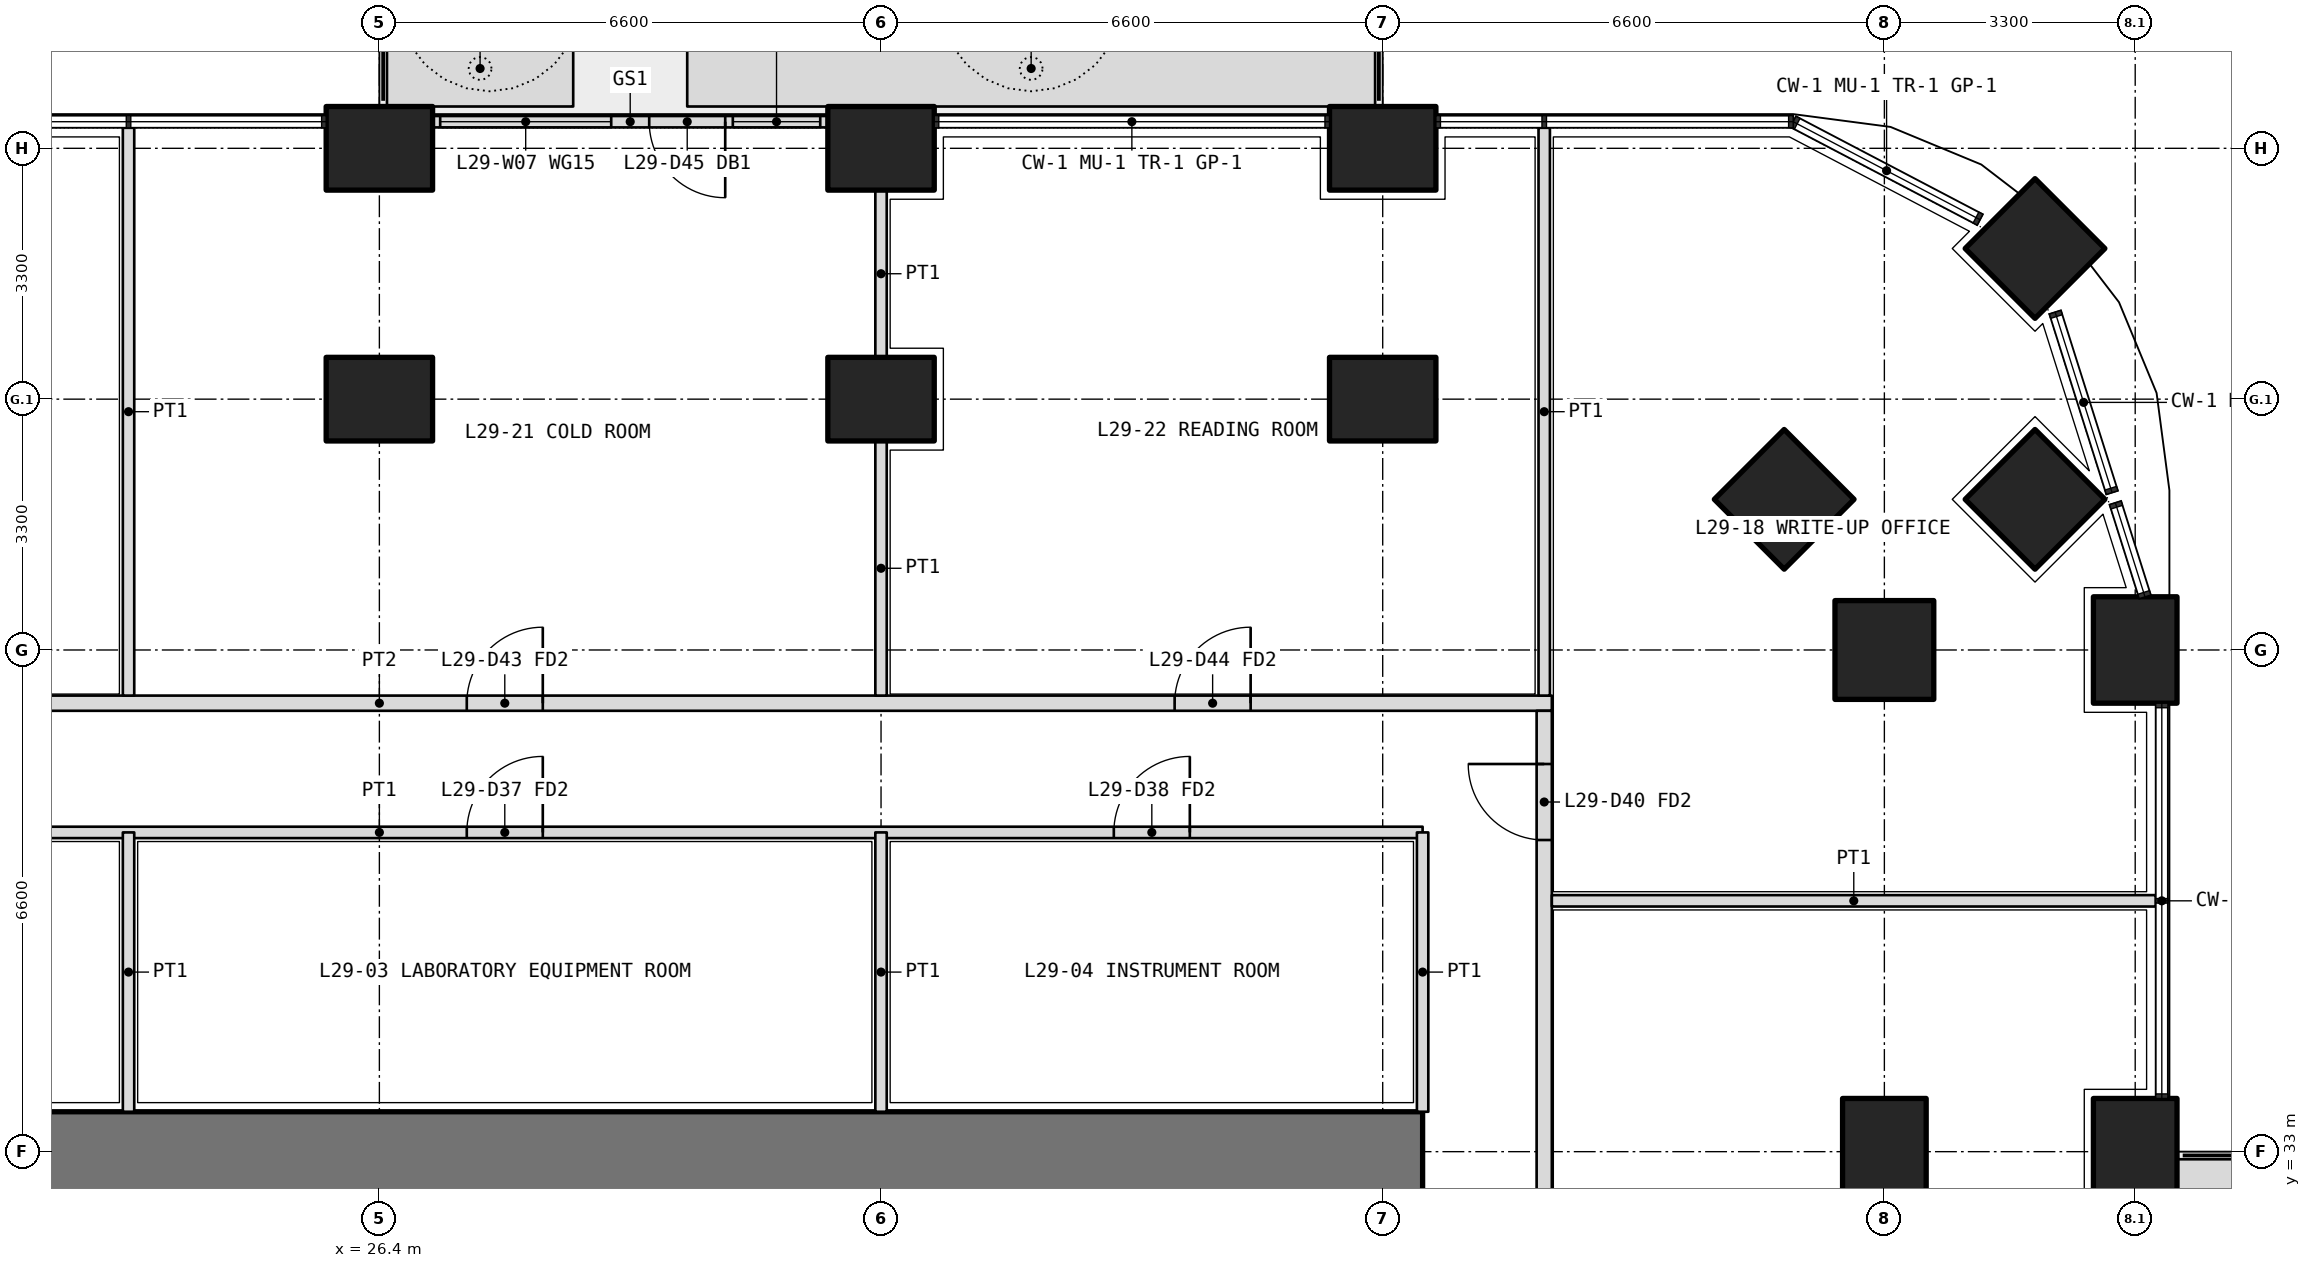
"""IFC4 building model, lengths in metres.
Left out: names, types, materials, properties, quantities, classifications, styles, units other than length and angle.
Written with IfcOpenShell. Run it as: python <this file> out.ifc"""

import sys

from ifc_helpers import new_model, si_unit, direction, frame, frame_2d, origin, origin_2d, place, context, subcontext, project, spatial, polyline, rectangle, outline, extrude, element, fill, save


model = new_model("IFC4")
c1 = context("Model", 3, precision=1e-05, world=origin(), true_north=direction((0.0, 1.0)))
c2 = subcontext(c1, "Body", "Model", "MODEL_VIEW")
j1 = project(units=[si_unit("LENGTHUNIT", "METRE"), si_unit("PLANEANGLEUNIT", "RADIAN")], contexts=[c1])
p1 = place(None, origin())
s1 = spatial("IfcSite", under=j1, at=p1, CompositionType="ELEMENT")
p2 = place(p1, origin())
s2 = spatial("IfcBuilding", under=s1, at=p2, CompositionType="ELEMENT")
p3 = place(p2, frame((0.0, 0.0, 128.4)))
s3 = spatial("IfcBuildingStorey", under=s2, at=p3, CompositionType="ELEMENT", Elevation=128.4)
p4 = place(p3, frame((48.182, 44.882, 0.0), z_axis=(0.0, 0.0, 1.0), x_axis=(0.707106781187, 0.707106781187, 0.0)))
e1 = element("IfcColumn", 1, at=p4, inside=s3, PredefinedType="COLUMN", context=c2, shape_type="SweptSolid", body=[
    extrude(rectangle(XDim=1.3, YDim=1.3, at=origin_2d()), origin(), (0.0, 0.0, 1.0), 4.2),
])
for number, where, z_axis, x_axis in (
    (2, (49.5, 33.0, 0.0), (0.0, 0.0, 1.0), (0.0, 1.0, 0.0)),
    (3, (49.5, 39.6, 0.0), (0.0, 0.0, 1.0), (0.0, 1.0, 0.0)),
    (4, (26.4, 46.2, 0.0), (0.0, 0.0, 1.0), (1.0, 0.0, 0.0)),
    (5, (33.0, 46.2, 0.0), (0.0, 0.0, 1.0), (1.0, 0.0, 0.0)),
    (6, (39.6, 46.2, 0.0), (0.0, 0.0, 1.0), (1.0, 0.0, 0.0)),
):
    element("IfcColumn", number, at=place(p3, frame(where, z_axis=z_axis, x_axis=x_axis)), inside=s3, PredefinedType="COLUMN", context=c2, shape_type="SweptSolid", body=[
        extrude(rectangle(XDim=1.4, YDim=1.1, at=origin_2d()), origin(), (0.0, 0.0, 1.0), 4.2),
    ])
for number, where, z_axis, x_axis in (
    (7, (46.2, 39.6, 0.0), (0.0, 0.0, 1.0), (1.0, 0.0, 0.0)),
    (8, (48.182, 41.582, 0.0), (0.0, 0.0, 1.0), (0.707, 0.707, 0.0)),
):
    element("IfcColumn", number, at=place(p3, frame(where, z_axis=z_axis, x_axis=x_axis)), inside=s3, PredefinedType="COLUMN", context=c2, shape_type="SweptSolid", body=[
        extrude(rectangle(XDim=1.3, YDim=1.3, at=origin_2d()), origin(), (0.0, 0.0, 1.0), 4.2),
    ])
for number, where, z_axis, x_axis in (
    (9, (26.4, 42.9, 0.0), (0.0, 0.0, 1.0), (1.0, 0.0, 0.0)),
    (10, (33.0, 42.9, 0.0), (0.0, 0.0, 1.0), (1.0, 0.0, 0.0)),
    (11, (39.6, 42.9, 0.0), (0.0, 0.0, 1.0), (1.0, 0.0, 0.0)),
):
    element("IfcColumn", number, at=place(p3, frame(where, z_axis=z_axis, x_axis=x_axis)), inside=s3, PredefinedType="COLUMN", context=c2, shape_type="SweptSolid", body=[
        extrude(rectangle(XDim=1.4, YDim=1.1, at=origin_2d()), origin(), (0.0, 0.0, 1.0), 4.2),
    ])
p5 = place(p3, frame((44.882, 41.582, 0.0), z_axis=(0.0, 0.0, 1.0), x_axis=(0.707106781187, 0.707106781187, 0.0)))
e12 = element("IfcColumn", 12, at=p5, inside=s3, PredefinedType="COLUMN", context=c2, shape_type="SweptSolid", body=[
    extrude(rectangle(XDim=1.3, YDim=1.3, at=origin_2d()), origin(), (0.0, 0.0, 1.0), 4.2),
])
p6 = place(p3, frame((46.2, 33.0, 0.0), z_axis=(0.0, 0.0, 1.0), x_axis=(0.0, 1.0, 0.0)))
e13 = element("IfcColumn", 13, at=p6, inside=s3, PredefinedType="COLUMN", context=c2, shape_type="SweptSolid", body=[
    extrude(rectangle(XDim=1.4, YDim=1.1, at=origin_2d()), origin(), (0.0, 0.0, 1.0), 4.2),
])
p7 = place(p3, origin())
e14 = element("IfcWall", 14, at=p7, inside=s3, PredefinedType="USERDEFINED", context=c2, shape_type="SweptSolid", body=[
    extrude(outline(polyline([(50.05, 23.85), (51.05, 23.85), (51.05, 32.9), (50.05, 32.9), (50.05, 23.85)]), holes=[polyline([(50.2, 24.0), (50.9, 24.0), (50.9, 32.75), (50.2, 32.75), (50.2, 24.0)])]), origin(), (0.0, 0.0, 1.0), 1.05),
])
p8 = place(p3, origin())
e15 = element("IfcWall", 15, at=p8, inside=s3, PredefinedType="USERDEFINED", context=c2, shape_type="SweptSolid", body=[
    extrude(outline(polyline([(26.5, 46.75), (28.95, 46.75), (28.95, 47.75), (26.5, 47.75), (26.5, 46.75)]), holes=[polyline([(26.65, 46.9), (28.8, 46.9), (28.8, 47.6), (26.65, 47.6), (26.65, 46.9)])]), origin(), (0.0, 0.0, 1.0), 1.05),
])
p9 = place(p3, origin())
e16 = element("IfcWall", 16, at=p9, inside=s3, PredefinedType="USERDEFINED", context=c2, shape_type="SweptSolid", body=[
    extrude(outline(polyline([(30.45, 46.75), (39.5, 46.75), (39.5, 47.75), (30.45, 47.75), (30.45, 46.75)]), holes=[polyline([(30.6, 46.9), (39.35, 46.9), (39.35, 47.6), (30.6, 47.6), (30.6, 46.9)])]), origin(), (0.0, 0.0, 1.0), 1.05),
])
p10 = place(p3, frame((32.3, 46.55, 0.0), z_axis=(0.0, 0.0, 1.0), x_axis=(-1.0, 0.0, 0.0)))
e17 = element("IfcWall", 17, at=p10, inside=s3, PredefinedType="SOLIDWALL", context=c2, shape_type="SweptSolid", body=[
    extrude(rectangle(XDim=5.2, YDim=0.15, at=frame_2d((2.6, 0.0))), origin(), (0.0, 0.0, 1.0), 2.7),
])
p11 = place(p10, frame((1.35, 0.0, 0.0)))
e18 = element("IfcOpeningElement", 18, at=p11, cuts=e17, PredefinedType="OPENING", context=c2, shape_type="SweptSolid", body=[
    extrude(rectangle(XDim=1.0, YDim=2.4, at=frame_2d((0.5, 1.2))), frame((0.0, 0.085, 0.0), z_axis=(0.0, -1.0, 0.0), x_axis=(1.0, 0.0, 0.0)), (0.0, 0.0, 1.0), 0.17),
])
p12 = place(p10, frame((0.1, 0.0, 0.1)))
e19 = element("IfcOpeningElement", 19, at=p12, cuts=e17, PredefinedType="OPENING", context=c2, shape_type="SweptSolid", body=[
    extrude(rectangle(XDim=1.15, YDim=2.3, at=frame_2d((0.575, 1.15))), frame((0.0, 0.085, 0.0), z_axis=(0.0, -1.0, 0.0), x_axis=(1.0, 0.0, 0.0)), (0.0, 0.0, 1.0), 0.17),
])
p13 = place(p10, frame((2.85, 0.0, 0.1)))
e20 = element("IfcOpeningElement", 20, at=p13, cuts=e17, PredefinedType="OPENING", context=c2, shape_type="SweptSolid", body=[
    extrude(rectangle(XDim=2.25, YDim=2.3, at=frame_2d((1.125, 1.15))), frame((0.0, 0.085, 0.0), z_axis=(0.0, -1.0, 0.0), x_axis=(1.0, 0.0, 0.0)), (0.0, 0.0, 1.0), 0.17),
])
p14 = place(p3, frame((40.125, 33.0, 0.0), z_axis=(0.0, 0.0, 1.0), x_axis=(-1.0, 0.0, 0.0)))
e21 = element("IfcWall", 21, at=p14, inside=s3, PredefinedType="SHEAR", context=c2, shape_type="SweptSolid", body=[
    extrude(rectangle(XDim=27.45, YDim=1.05, at=frame_2d((13.725, 0.0))), origin(), (0.0, 0.0, 1.0), 4.2),
])
p15 = place(p3, frame((12.675, 37.2, 0.0), z_axis=(0.0, 0.0, 1.0), x_axis=(1.0, 0.0, 0.0)))
e22 = element("IfcWall", 22, at=p15, inside=s3, PredefinedType="PARTITIONING", context=c2, shape_type="SweptSolid", body=[
    extrude(rectangle(XDim=27.45, YDim=0.15, at=frame_2d((13.725, 0.0))), origin(), (0.0, 0.0, 1.0), 2.85),
])
p16 = place(p15, frame((1.413, 0.0, 0.0)))
e23 = element("IfcOpeningElement", 23, at=p16, cuts=e22, PredefinedType="OPENING", context=c2, shape_type="SweptSolid", body=[
    extrude(rectangle(XDim=1.0, YDim=2.1, at=frame_2d((0.5, 1.05))), frame((0.0, 0.085, 0.0), z_axis=(0.0, -1.0, 0.0), x_axis=(1.0, 0.0, 0.0)), (0.0, 0.0, 1.0), 0.17),
])
p17 = place(p15, frame((6.625, 0.0, 0.0)))
e24 = element("IfcOpeningElement", 24, at=p17, cuts=e22, PredefinedType="OPENING", context=c2, shape_type="SweptSolid", body=[
    extrude(rectangle(XDim=1.0, YDim=2.1, at=frame_2d((0.5, 1.05))), frame((0.0, 0.085, 0.0), z_axis=(0.0, -1.0, 0.0), x_axis=(1.0, 0.0, 0.0)), (0.0, 0.0, 1.0), 0.17),
])
p18 = place(p15, frame((14.875, 0.0, 0.0)))
e25 = element("IfcOpeningElement", 25, at=p18, cuts=e22, PredefinedType="OPENING", context=c2, shape_type="SweptSolid", body=[
    extrude(rectangle(XDim=1.0, YDim=2.1, at=frame_2d((0.5, 1.05))), frame((0.0, 0.085, 0.0), z_axis=(0.0, -1.0, 0.0), x_axis=(1.0, 0.0, 0.0)), (0.0, 0.0, 1.0), 0.17),
])
p19 = place(p15, frame((23.387, 0.0, 0.0)))
e26 = element("IfcOpeningElement", 26, at=p19, cuts=e22, PredefinedType="OPENING", context=c2, shape_type="SweptSolid", body=[
    extrude(rectangle(XDim=1.0, YDim=2.1, at=frame_2d((0.5, 1.05))), frame((0.0, 0.085, 0.0), z_axis=(0.0, -1.0, 0.0), x_axis=(1.0, 0.0, 0.0)), (0.0, 0.0, 1.0), 0.17),
])
p20 = place(p3, frame((40.125, 33.525, 0.0), z_axis=(0.0, 0.0, 1.0), x_axis=(0.0, 1.0, 0.0)))
e27 = element("IfcWall", 27, at=p20, inside=s3, PredefinedType="PARTITIONING", context=c2, shape_type="SweptSolid", body=[
    extrude(rectangle(XDim=3.675, YDim=0.15, at=frame_2d((1.837, 0.0))), origin(), (0.0, 0.0, 1.0), 2.85),
])
p21 = place(p3, frame((23.1, 33.525, 0.0), z_axis=(0.0, 0.0, 1.0), x_axis=(0.0, 1.0, 0.0)))
e28 = element("IfcWall", 28, at=p21, inside=s3, PredefinedType="PARTITIONING", context=c2, shape_type="SweptSolid", body=[
    extrude(rectangle(XDim=3.675, YDim=0.15, at=frame_2d((1.837, 0.0))), origin(), (0.0, 0.0, 1.0), 3.9),
])
p22 = place(p3, frame((33.0, 33.525, 0.0), z_axis=(0.0, 0.0, 1.0), x_axis=(0.0, 1.0, 0.0)))
e29 = element("IfcWall", 29, at=p22, inside=s3, PredefinedType="PARTITIONING", context=c2, shape_type="SweptSolid", body=[
    extrude(rectangle(XDim=3.675, YDim=0.15, at=frame_2d((1.837, 0.0))), origin(), (0.0, 0.0, 1.0), 2.85),
])
p23 = place(p3, frame((10.975, 38.9, 0.0), z_axis=(0.0, 0.0, 1.0), x_axis=(1.0, 0.0, 0.0)))
e30 = element("IfcWall", 30, at=p23, inside=s3, PredefinedType="PARTITIONING", context=c2, shape_type="SweptSolid", body=[
    extrude(rectangle(XDim=30.85, YDim=0.2, at=frame_2d((15.425, 0.0))), origin(), (0.0, 0.0, 1.0), 2.85),
])
p24 = place(p23, frame((0.562, 0.0, 0.0)))
e31 = element("IfcOpeningElement", 31, at=p24, cuts=e30, PredefinedType="OPENING", context=c2, shape_type="SweptSolid", body=[
    extrude(rectangle(XDim=1.2, YDim=2.1, at=frame_2d((0.6, 1.05))), frame((0.0, 0.11, 0.0), z_axis=(0.0, -1.0, 0.0), x_axis=(1.0, 0.0, 0.0)), (0.0, 0.0, 1.0), 0.22),
])
p25 = place(p23, frame((6.675, 0.0, 0.0)))
e32 = element("IfcOpeningElement", 32, at=p25, cuts=e30, PredefinedType="OPENING", context=c2, shape_type="SweptSolid", body=[
    extrude(rectangle(XDim=1.0, YDim=2.1, at=frame_2d((0.5, 1.05))), frame((0.0, 0.11, 0.0), z_axis=(0.0, -1.0, 0.0), x_axis=(1.0, 0.0, 0.0)), (0.0, 0.0, 1.0), 0.22),
])
p26 = place(p23, frame((16.575, 0.0, 0.0)))
e33 = element("IfcOpeningElement", 33, at=p26, cuts=e30, PredefinedType="OPENING", context=c2, shape_type="SweptSolid", body=[
    extrude(rectangle(XDim=1.0, YDim=2.1, at=frame_2d((0.5, 1.05))), frame((0.0, 0.11, 0.0), z_axis=(0.0, -1.0, 0.0), x_axis=(1.0, 0.0, 0.0)), (0.0, 0.0, 1.0), 0.22),
])
p27 = place(p23, frame((25.887, 0.0, 0.0)))
e34 = element("IfcOpeningElement", 34, at=p27, cuts=e30, PredefinedType="OPENING", context=c2, shape_type="SweptSolid", body=[
    extrude(rectangle(XDim=1.0, YDim=2.1, at=frame_2d((0.5, 1.05))), frame((0.0, 0.11, 0.0), z_axis=(0.0, -1.0, 0.0), x_axis=(1.0, 0.0, 0.0)), (0.0, 0.0, 1.0), 0.22),
])
p28 = place(p3, frame((41.725, 11.175, 0.0), z_axis=(0.0, 0.0, 1.0), x_axis=(0.0, 1.0, 0.0)))
e35 = element("IfcWall", 35, at=p28, inside=s3, PredefinedType="PARTITIONING", context=c2, shape_type="SweptSolid", body=[
    extrude(rectangle(XDim=27.625, YDim=0.2, at=frame_2d((13.812, 0.0))), origin(), (0.0, 0.0, 1.0), 2.85),
])
p29 = place(p28, frame((3.762, 0.0, 0.0)))
e36 = element("IfcOpeningElement", 36, at=p29, cuts=e35, PredefinedType="OPENING", context=c2, shape_type="SweptSolid", body=[
    extrude(rectangle(XDim=1.0, YDim=2.1, at=frame_2d((0.5, 1.05))), frame((0.0, 0.11, 0.0), z_axis=(0.0, -1.0, 0.0), x_axis=(1.0, 0.0, 0.0)), (0.0, 0.0, 1.0), 0.22),
])
p30 = place(p28, frame((9.725, 0.0, 0.0)))
e37 = element("IfcOpeningElement", 37, at=p30, cuts=e35, PredefinedType="OPENING", context=c2, shape_type="SweptSolid", body=[
    extrude(rectangle(XDim=1.0, YDim=2.1, at=frame_2d((0.5, 1.05))), frame((0.0, 0.11, 0.0), z_axis=(0.0, -1.0, 0.0), x_axis=(1.0, 0.0, 0.0)), (0.0, 0.0, 1.0), 0.22),
])
p31 = place(p28, frame((13.075, 0.0, 0.0)))
e38 = element("IfcOpeningElement", 38, at=p31, cuts=e35, PredefinedType="OPENING", context=c2, shape_type="SweptSolid", body=[
    extrude(rectangle(XDim=0.9, YDim=2.1, at=frame_2d((0.45, 1.05))), frame((0.0, 0.11, 0.0), z_axis=(0.0, -1.0, 0.0), x_axis=(1.0, 0.0, 0.0)), (0.0, 0.0, 1.0), 0.22),
])
p32 = place(p28, frame((19.675, 0.0, 0.0)))
e39 = element("IfcOpeningElement", 39, at=p32, cuts=e35, PredefinedType="OPENING", context=c2, shape_type="SweptSolid", body=[
    extrude(rectangle(XDim=1.0, YDim=2.1, at=frame_2d((0.5, 1.05))), frame((0.0, 0.11, 0.0), z_axis=(0.0, -1.0, 0.0), x_axis=(1.0, 0.0, 0.0)), (0.0, 0.0, 1.0), 0.22),
])
p33 = place(p28, frame((25.925, 0.0, 0.0)))
e40 = element("IfcOpeningElement", 40, at=p33, cuts=e35, PredefinedType="OPENING", context=c2, shape_type="SweptSolid", body=[
    extrude(rectangle(XDim=1.0, YDim=2.1, at=frame_2d((0.5, 1.05))), frame((0.0, 0.11, 0.0), z_axis=(0.0, -1.0, 0.0), x_axis=(1.0, 0.0, 0.0)), (0.0, 0.0, 1.0), 0.22),
])
p34 = place(p3, frame((41.725, 46.47, 0.0), z_axis=(0.0, 0.0, 1.0), x_axis=(0.0, -1.0, 0.0)))
e41 = element("IfcWall", 41, at=p34, inside=s3, PredefinedType="PARTITIONING", context=c2, shape_type="SweptSolid", body=[
    extrude(rectangle(XDim=7.47, YDim=0.15, at=frame_2d((3.735, 0.0))), origin(), (0.0, 0.0, 1.0), 2.7),
])
p35 = place(p3, frame((49.77, 36.3, 0.0), z_axis=(0.0, 0.0, 1.0), x_axis=(-1.0, 0.0, 0.0)))
e42 = element("IfcWall", 42, at=p35, inside=s3, PredefinedType="PARTITIONING", context=c2, shape_type="SweptSolid", body=[
    extrude(rectangle(XDim=7.945, YDim=0.15, at=frame_2d((3.973, 0.0))), origin(), (0.0, 0.0, 1.0), 2.7),
])
p36 = place(p3, frame((23.1, 46.47, 0.0), z_axis=(0.0, 0.0, 1.0), x_axis=(0.0, -1.0, 0.0)))
e43 = element("IfcWall", 43, at=p36, inside=s3, PredefinedType="PARTITIONING", context=c2, shape_type="SweptSolid", body=[
    extrude(rectangle(XDim=7.47, YDim=0.15, at=frame_2d((3.735, 0.0))), origin(), (0.0, 0.0, 1.0), 2.7),
])
p37 = place(p3, frame((33.0, 45.65, 0.0), z_axis=(0.0, 0.0, 1.0), x_axis=(0.0, -1.0, 0.0)))
e44 = element("IfcWall", 44, at=p37, inside=s3, PredefinedType="PARTITIONING", context=c2, shape_type="SweptSolid", body=[
    extrude(rectangle(XDim=2.2, YDim=0.15, at=frame_2d((1.1, 0.0))), origin(), (0.0, 0.0, 1.0), 2.85),
])
p38 = place(p3, frame((33.0, 42.35, 0.0), z_axis=(0.0, 0.0, 1.0), x_axis=(0.0, -1.0, 0.0)))
e45 = element("IfcWall", 45, at=p38, inside=s3, PredefinedType="PARTITIONING", context=c2, shape_type="SweptSolid", body=[
    extrude(rectangle(XDim=3.35, YDim=0.15, at=frame_2d((1.675, 0.0))), origin(), (0.0, 0.0, 1.0), 2.85),
])
p39 = place(p11, origin())
e46 = element("IfcDoor", 46, at=p39, inside=s3, OperationType="SINGLE_SWING_LEFT", PredefinedType="DOOR", context=c2, shape_type="SweptSolid", body=[
    extrude(rectangle(XDim=1.0, YDim=2.4, at=frame_2d((0.5, 1.2))), frame((0.0, 0.025, 0.0), z_axis=(0.0, -1.0, 0.0), x_axis=(1.0, 0.0, 0.0)), (0.0, 0.0, 1.0), 0.05),
])
fill(e18, e46)
p40 = place(p12, origin())
e47 = element("IfcWindow", 47, at=p40, inside=s3, PartitioningType="SINGLE_PANEL", PredefinedType="WINDOW", context=c2, shape_type="SweptSolid", body=[
    extrude(rectangle(XDim=1.15, YDim=2.3, at=frame_2d((0.575, 1.15))), frame((0.0, 0.03, 0.0), z_axis=(0.0, -1.0, 0.0), x_axis=(1.0, 0.0, 0.0)), (0.0, 0.0, 1.0), 0.06),
])
fill(e19, e47)
p41 = place(p13, origin())
e48 = element("IfcWindow", 48, at=p41, inside=s3, PartitioningType="SINGLE_PANEL", PredefinedType="WINDOW", context=c2, shape_type="SweptSolid", body=[
    extrude(rectangle(XDim=2.25, YDim=2.3, at=frame_2d((1.125, 1.15))), frame((0.0, 0.03, 0.0), z_axis=(0.0, -1.0, 0.0), x_axis=(1.0, 0.0, 0.0)), (0.0, 0.0, 1.0), 0.06),
])
fill(e20, e48)
p42 = place(p18, origin())
e49 = element("IfcDoor", 49, at=p42, inside=s3, OperationType="SINGLE_SWING_RIGHT", PredefinedType="DOOR", context=c2, shape_type="SweptSolid", body=[
    extrude(rectangle(XDim=1.0, YDim=2.1, at=frame_2d((0.5, 1.05))), frame((0.0, 0.025, 0.0), z_axis=(0.0, -1.0, 0.0), x_axis=(1.0, 0.0, 0.0)), (0.0, 0.0, 1.0), 0.05),
])
fill(e25, e49)
p43 = place(p19, origin())
e50 = element("IfcDoor", 50, at=p43, inside=s3, OperationType="SINGLE_SWING_RIGHT", PredefinedType="DOOR", context=c2, shape_type="SweptSolid", body=[
    extrude(rectangle(XDim=1.0, YDim=2.1, at=frame_2d((0.5, 1.05))), frame((0.0, 0.025, 0.0), z_axis=(0.0, -1.0, 0.0), x_axis=(1.0, 0.0, 0.0)), (0.0, 0.0, 1.0), 0.05),
])
fill(e26, e50)
p44 = place(p33, origin())
e51 = element("IfcDoor", 51, at=p44, inside=s3, OperationType="SINGLE_SWING_RIGHT", PredefinedType="DOOR", context=c2, shape_type="SweptSolid", body=[
    extrude(rectangle(XDim=1.0, YDim=2.1, at=frame_2d((0.5, 1.05))), frame((0.0, 0.025, 0.0), z_axis=(0.0, -1.0, 0.0), x_axis=(1.0, 0.0, 0.0)), (0.0, 0.0, 1.0), 0.05),
])
fill(e40, e51)
p45 = place(p26, origin())
e52 = element("IfcDoor", 52, at=p45, inside=s3, OperationType="SINGLE_SWING_RIGHT", PredefinedType="DOOR", context=c2, shape_type="SweptSolid", body=[
    extrude(rectangle(XDim=1.0, YDim=2.1, at=frame_2d((0.5, 1.05))), frame((0.0, 0.025, 0.0), z_axis=(0.0, -1.0, 0.0), x_axis=(1.0, 0.0, 0.0)), (0.0, 0.0, 1.0), 0.05),
])
fill(e33, e52)
p46 = place(p27, origin())
e53 = element("IfcDoor", 53, at=p46, inside=s3, OperationType="SINGLE_SWING_RIGHT", PredefinedType="DOOR", context=c2, shape_type="SweptSolid", body=[
    extrude(rectangle(XDim=1.0, YDim=2.1, at=frame_2d((0.5, 1.05))), frame((0.0, 0.025, 0.0), z_axis=(0.0, -1.0, 0.0), x_axis=(1.0, 0.0, 0.0)), (0.0, 0.0, 1.0), 0.05),
])
fill(e34, e53)
save(model, sys.argv[1])
